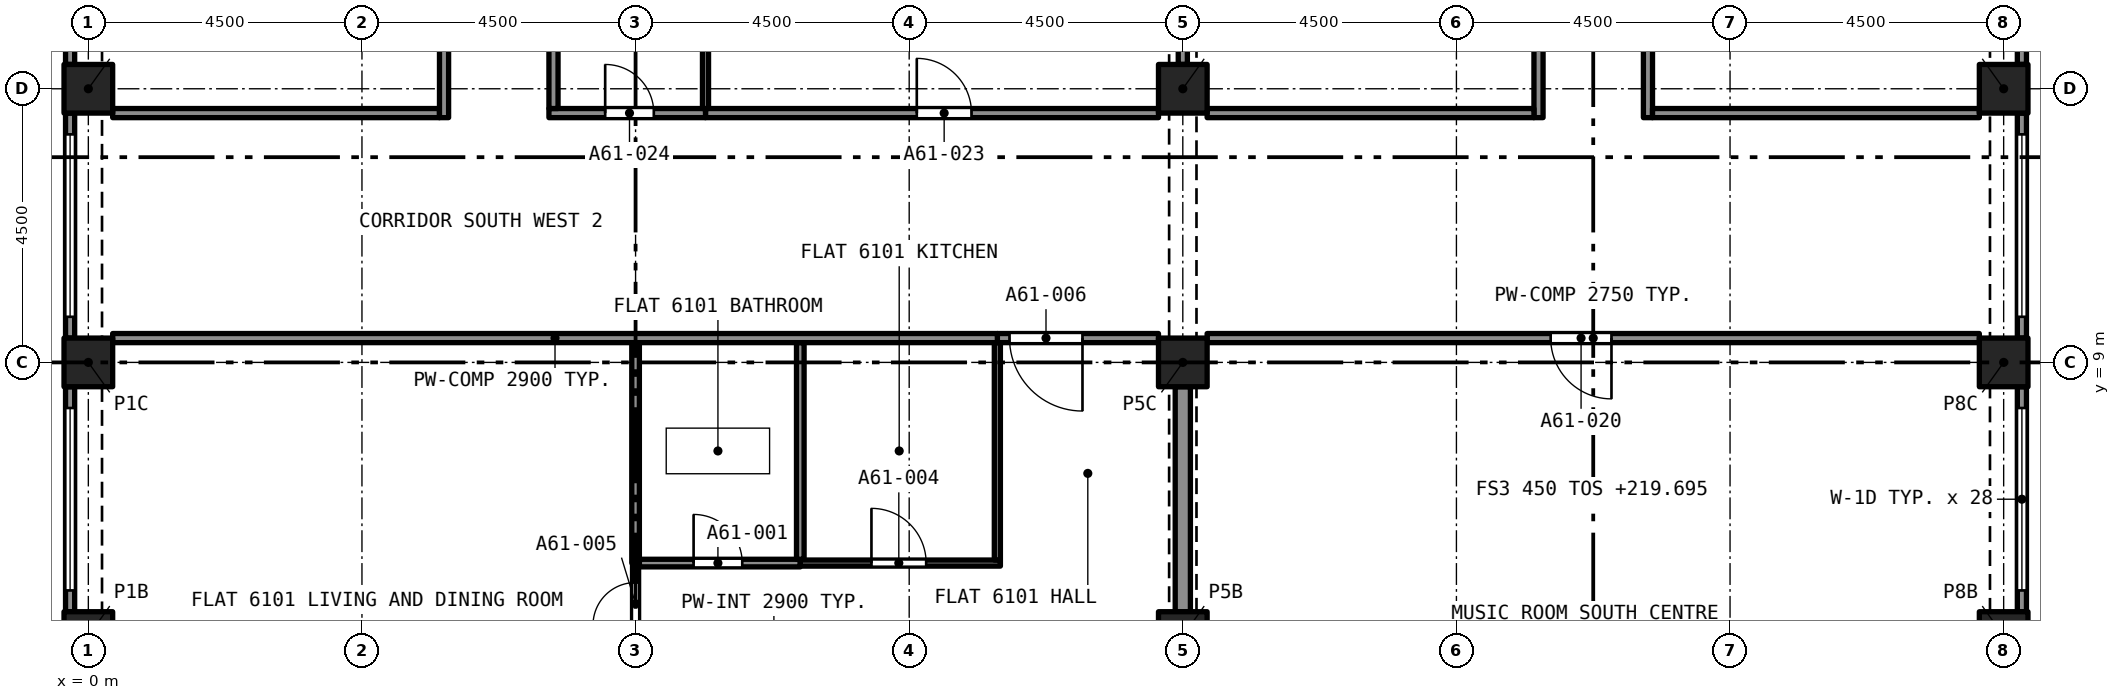
"""IFC4 building model, lengths in metres.
Left out: names, types, materials, properties, quantities, classifications, styles, units other than length and angle.
Written with IfcOpenShell. Run it as: python <this file> out.ifc"""

import sys

from ifc_helpers import new_model, si_unit, direction, frame, frame_2d, origin, origin_2d, place, context, subcontext, project, spatial, rectangle, extrude, element, fill, save


model = new_model("IFC4")
c1 = context("Model", 3, precision=1e-05, world=origin(), true_north=direction((0.0, 1.0)))
c2 = subcontext(c1, "Body", "Model", "MODEL_VIEW")
j1 = project(units=[si_unit("LENGTHUNIT", "METRE"), si_unit("PLANEANGLEUNIT", "RADIAN")], contexts=[c1])
p1 = place(None, origin())
s1 = spatial("IfcSite", under=j1, at=p1, CompositionType="ELEMENT")
p2 = place(p1, origin())
s2 = spatial("IfcBuilding", under=s1, at=p2, CompositionType="ELEMENT")
p3 = place(p2, frame((0.0, 0.0, 219.695)))
s3 = spatial("IfcBuildingStorey", under=s2, at=p3, CompositionType="ELEMENT", Elevation=219.695)
for number, where, z_axis, x_axis in (
    (1, (0.0, 4.5, 0.0), (0.0, 0.0, 1.0), (1.0, 0.0, 0.0)),
    (2, (18.0, 4.5, 0.0), (0.0, 0.0, 1.0), (1.0, 0.0, 0.0)),
    (3, (31.5, 4.5, 0.0), (0.0, 0.0, 1.0), (1.0, 0.0, 0.0)),
    (4, (0.0, 9.0, 0.0), (0.0, 0.0, 1.0), (1.0, 0.0, 0.0)),
    (5, (18.0, 9.0, 0.0), (0.0, 0.0, 1.0), (1.0, 0.0, 0.0)),
    (6, (31.5, 9.0, 0.0), (0.0, 0.0, 1.0), (1.0, 0.0, 0.0)),
    (7, (0.0, 13.5, 0.0), (0.0, 0.0, 1.0), (1.0, 0.0, 0.0)),
    (8, (18.0, 13.5, 0.0), (0.0, 0.0, 1.0), (1.0, 0.0, 0.0)),
    (9, (31.5, 13.5, 0.0), (0.0, 0.0, 1.0), (1.0, 0.0, 0.0)),
):
    element("IfcColumn", number, at=place(p3, frame(where, z_axis=z_axis, x_axis=x_axis)), inside=s3, PredefinedType="COLUMN", context=c2, shape_type="SweptSolid", body=[
        extrude(rectangle(XDim=0.8, YDim=0.8, at=origin_2d()), origin(), (0.0, 0.0, 1.0), 3.2),
    ])
p4 = place(p3, frame((31.8, 8.6, 0.0), z_axis=(0.0, 0.0, 1.0), x_axis=(0.0, -1.0, 0.0)))
e10 = element("IfcWall", 10, at=p4, inside=s3, PredefinedType="SOLIDWALL", context=c2, shape_type="SweptSolid", body=[
    extrude(rectangle(XDim=3.7, YDim=0.15, at=frame_2d((1.85, 0.0))), origin(), (0.0, 0.0, 1.0), 3.2),
])
p5 = place(p4, frame((0.35, 0.0, 0.45)))
e11 = element("IfcOpeningElement", 11, at=p5, cuts=e10, PredefinedType="OPENING", context=c2, shape_type="SweptSolid", body=[
    extrude(rectangle(XDim=3.0, YDim=1.95, at=frame_2d((1.5, 0.975))), frame((0.0, 0.085, 0.0), z_axis=(0.0, -1.0, 0.0), x_axis=(1.0, 0.0, 0.0)), (0.0, 0.0, 1.0), 0.17),
])
p6 = place(p3, frame((31.8, 13.1, 0.0), z_axis=(0.0, 0.0, 1.0), x_axis=(0.0, -1.0, 0.0)))
e12 = element("IfcWall", 12, at=p6, inside=s3, PredefinedType="SOLIDWALL", context=c2, shape_type="SweptSolid", body=[
    extrude(rectangle(XDim=3.7, YDim=0.15, at=frame_2d((1.85, 0.0))), origin(), (0.0, 0.0, 1.0), 3.2),
])
p7 = place(p6, frame((0.35, 0.0, 0.45)))
e13 = element("IfcOpeningElement", 13, at=p7, cuts=e12, PredefinedType="OPENING", context=c2, shape_type="SweptSolid", body=[
    extrude(rectangle(XDim=3.0, YDim=1.95, at=frame_2d((1.5, 0.975))), frame((0.0, 0.085, 0.0), z_axis=(0.0, -1.0, 0.0), x_axis=(1.0, 0.0, 0.0)), (0.0, 0.0, 1.0), 0.17),
])
p8 = place(p3, frame((31.8, 17.6, 0.0), z_axis=(0.0, 0.0, 1.0), x_axis=(0.0, -1.0, 0.0)))
e14 = element("IfcWall", 14, at=p8, inside=s3, PredefinedType="SOLIDWALL", context=c2, shape_type="SweptSolid", body=[
    extrude(rectangle(XDim=3.7, YDim=0.15, at=frame_2d((1.85, 0.0))), origin(), (0.0, 0.0, 1.0), 3.2),
])
p9 = place(p8, frame((0.35, 0.0, 0.45)))
e15 = element("IfcOpeningElement", 15, at=p9, cuts=e14, PredefinedType="OPENING", context=c2, shape_type="SweptSolid", body=[
    extrude(rectangle(XDim=3.0, YDim=1.95, at=frame_2d((1.5, 0.975))), frame((0.0, 0.085, 0.0), z_axis=(0.0, -1.0, 0.0), x_axis=(1.0, 0.0, 0.0)), (0.0, 0.0, 1.0), 0.17),
])
p10 = place(p3, frame((-0.3, 13.9, 0.0), z_axis=(0.0, 0.0, 1.0), x_axis=(0.0, 1.0, 0.0)))
e16 = element("IfcWall", 16, at=p10, inside=s3, PredefinedType="SOLIDWALL", context=c2, shape_type="SweptSolid", body=[
    extrude(rectangle(XDim=3.7, YDim=0.15, at=frame_2d((1.85, 0.0))), origin(), (0.0, 0.0, 1.0), 3.2),
])
p11 = place(p10, frame((0.35, 0.0, 0.45)))
e17 = element("IfcOpeningElement", 17, at=p11, cuts=e16, PredefinedType="OPENING", context=c2, shape_type="SweptSolid", body=[
    extrude(rectangle(XDim=3.0, YDim=1.95, at=frame_2d((1.5, 0.975))), frame((0.0, 0.085, 0.0), z_axis=(0.0, -1.0, 0.0), x_axis=(1.0, 0.0, 0.0)), (0.0, 0.0, 1.0), 0.17),
])
p12 = place(p3, frame((-0.3, 9.4, 0.0), z_axis=(0.0, 0.0, 1.0), x_axis=(0.0, 1.0, 0.0)))
e18 = element("IfcWall", 18, at=p12, inside=s3, PredefinedType="SOLIDWALL", context=c2, shape_type="SweptSolid", body=[
    extrude(rectangle(XDim=3.7, YDim=0.15, at=frame_2d((1.85, 0.0))), origin(), (0.0, 0.0, 1.0), 3.2),
])
p13 = place(p12, frame((0.35, 0.0, 0.45)))
e19 = element("IfcOpeningElement", 19, at=p13, cuts=e18, PredefinedType="OPENING", context=c2, shape_type="SweptSolid", body=[
    extrude(rectangle(XDim=3.0, YDim=1.95, at=frame_2d((1.5, 0.975))), frame((0.0, 0.085, 0.0), z_axis=(0.0, -1.0, 0.0), x_axis=(1.0, 0.0, 0.0)), (0.0, 0.0, 1.0), 0.17),
])
p14 = place(p3, frame((-0.3, 4.9, 0.0), z_axis=(0.0, 0.0, 1.0), x_axis=(0.0, 1.0, 0.0)))
e20 = element("IfcWall", 20, at=p14, inside=s3, PredefinedType="SOLIDWALL", context=c2, shape_type="SweptSolid", body=[
    extrude(rectangle(XDim=3.7, YDim=0.15, at=frame_2d((1.85, 0.0))), origin(), (0.0, 0.0, 1.0), 3.2),
])
p15 = place(p14, frame((0.35, 0.0, 0.45)))
e21 = element("IfcOpeningElement", 21, at=p15, cuts=e20, PredefinedType="OPENING", context=c2, shape_type="SweptSolid", body=[
    extrude(rectangle(XDim=3.0, YDim=1.95, at=frame_2d((1.5, 0.975))), frame((0.0, 0.085, 0.0), z_axis=(0.0, -1.0, 0.0), x_axis=(1.0, 0.0, 0.0)), (0.0, 0.0, 1.0), 0.17),
])
p16 = place(p3, frame((9.062, 5.7, 0.0), z_axis=(0.0, 0.0, 1.0), x_axis=(1.0, 0.0, 0.0)))
e22 = element("IfcWall", 22, at=p16, inside=s3, PredefinedType="PARTITIONING", context=c2, shape_type="SweptSolid", body=[
    extrude(rectangle(XDim=2.646, YDim=0.125, at=frame_2d((1.323, 0.0))), origin(), (0.0, 0.0, 1.0), 2.9),
])
p17 = place(p16, frame((0.892, 0.0, 0.0)))
e23 = element("IfcOpeningElement", 23, at=p17, cuts=e22, PredefinedType="OPENING", context=c2, shape_type="SweptSolid", body=[
    extrude(rectangle(XDim=0.8, YDim=2.1, at=frame_2d((0.4, 1.05))), frame((0.0, 0.073, 0.0), z_axis=(0.0, -1.0, 0.0), x_axis=(1.0, 0.0, 0.0)), (0.0, 0.0, 1.0), 0.145),
])
p18 = place(p3, frame((11.709, 5.762, 0.0), z_axis=(0.0, 0.0, 1.0), x_axis=(0.0, 1.0, 0.0)))
e24 = element("IfcWall", 24, at=p18, inside=s3, PredefinedType="PARTITIONING", context=c2, shape_type="SweptSolid", body=[
    extrude(rectangle(XDim=3.562, YDim=0.125, at=frame_2d((1.781, 0.0))), origin(), (0.0, 0.0, 1.0), 2.9),
])
p19 = place(p3, frame((9.0, 5.7, 0.0), z_axis=(0.0, 0.0, 1.0), x_axis=(0.0, 1.0, 0.0)))
e25 = element("IfcWall", 25, at=p19, inside=s3, PredefinedType="PARTITIONING", context=c2, shape_type="SweptSolid", body=[
    extrude(rectangle(XDim=3.625, YDim=0.125, at=frame_2d((1.812, 0.0))), origin(), (0.0, 0.0, 1.0), 2.9),
])
p20 = place(p3, frame((11.708, 5.7, 0.0), z_axis=(0.0, 0.0, 1.0), x_axis=(1.0, 0.0, 0.0)))
e26 = element("IfcWall", 26, at=p20, inside=s3, PredefinedType="PARTITIONING", context=c2, shape_type="SweptSolid", body=[
    extrude(rectangle(XDim=3.292, YDim=0.1, at=frame_2d((1.646, 0.0))), origin(), (0.0, 0.0, 1.0), 2.9),
])
p21 = place(p20, frame((1.171, 0.0, 0.0)))
e27 = element("IfcOpeningElement", 27, at=p21, cuts=e26, PredefinedType="OPENING", context=c2, shape_type="SweptSolid", body=[
    extrude(rectangle(XDim=0.9, YDim=2.1, at=frame_2d((0.45, 1.05))), frame((0.0, 0.06, 0.0), z_axis=(0.0, -1.0, 0.0), x_axis=(1.0, 0.0, 0.0)), (0.0, 0.0, 1.0), 0.12),
])
p22 = place(p3, frame((14.95, 5.75, 0.0), z_axis=(0.0, 0.0, 1.0), x_axis=(0.0, 1.0, 0.0)))
e28 = element("IfcWall", 28, at=p22, inside=s3, PredefinedType="PARTITIONING", context=c2, shape_type="SweptSolid", body=[
    extrude(rectangle(XDim=3.575, YDim=0.1, at=frame_2d((1.788, 0.0))), origin(), (0.0, 0.0, 1.0), 2.9),
])
p23 = place(p3, frame((9.0, 4.36, 0.0), z_axis=(0.0, 0.0, 1.0), x_axis=(0.0, 1.0, 0.0)))
e29 = element("IfcWall", 29, at=p23, inside=s3, PredefinedType="PARTITIONING", context=c2, shape_type="SweptSolid", body=[
    extrude(rectangle(XDim=1.34, YDim=0.1, at=frame_2d((0.67, 0.0))), origin(), (0.0, 0.0, 1.0), 2.9),
])
p24 = place(p23, frame((0.32, 0.0, 0.0)))
e30 = element("IfcOpeningElement", 30, at=p24, cuts=e29, PredefinedType="OPENING", context=c2, shape_type="SweptSolid", body=[
    extrude(rectangle(XDim=0.7, YDim=2.1, at=frame_2d((0.35, 1.05))), frame((0.0, 0.06, 0.0), z_axis=(0.0, -1.0, 0.0), x_axis=(1.0, 0.0, 0.0)), (0.0, 0.0, 1.0), 0.12),
])
p25 = place(p3, frame((18.0, 4.9, 0.0), z_axis=(0.0, 0.0, 1.0), x_axis=(0.0, 1.0, 0.0)))
e31 = element("IfcWall", 31, at=p25, inside=s3, PredefinedType="PARTITIONING", context=c2, shape_type="SweptSolid", body=[
    extrude(rectangle(XDim=3.7, YDim=0.25, at=frame_2d((1.85, 0.0))), origin(), (0.0, 0.0, 1.0), 2.38),
])
p26 = place(p3, frame((17.6, 9.4, 0.0), z_axis=(0.0, 0.0, 1.0), x_axis=(-1.0, 0.0, 0.0)))
e32 = element("IfcWall", 32, at=p26, inside=s3, PredefinedType="PARTITIONING", context=c2, shape_type="SweptSolid", body=[
    extrude(rectangle(XDim=2.65, YDim=0.15, at=frame_2d((1.325, 0.0))), origin(), (0.0, 0.0, 1.0), 2.9),
])
p27 = place(p26, frame((1.25, 0.0, 0.0)))
e33 = element("IfcOpeningElement", 33, at=p27, cuts=e32, PredefinedType="OPENING", context=c2, shape_type="SweptSolid", body=[
    extrude(rectangle(XDim=1.2, YDim=2.4, at=frame_2d((0.6, 1.2))), frame((0.0, 0.085, 0.0), z_axis=(0.0, -1.0, 0.0), x_axis=(1.0, 0.0, 0.0)), (0.0, 0.0, 1.0), 0.17),
])
p28 = place(p3, frame((0.4, 9.4, 0.0), z_axis=(0.0, 0.0, 1.0), x_axis=(1.0, 0.0, 0.0)))
e34 = element("IfcWall", 34, at=p28, inside=s3, PredefinedType="PARTITIONING", context=c2, shape_type="SweptSolid", body=[
    extrude(rectangle(XDim=14.55, YDim=0.15, at=frame_2d((7.275, 0.0))), origin(), (0.0, 0.0, 1.0), 2.9),
])
p29 = place(p3, frame((31.1, 9.4, 0.0), z_axis=(0.0, 0.0, 1.0), x_axis=(-1.0, 0.0, 0.0)))
e35 = element("IfcWall", 35, at=p29, inside=s3, PredefinedType="PARTITIONING", context=c2, shape_type="SweptSolid", body=[
    extrude(rectangle(XDim=12.7, YDim=0.15, at=frame_2d((6.35, 0.0))), origin(), (0.0, 0.0, 1.0), 2.75),
])
p30 = place(p29, frame((6.05, 0.0, 0.0)))
e36 = element("IfcOpeningElement", 36, at=p30, cuts=e35, PredefinedType="OPENING", context=c2, shape_type="SweptSolid", body=[
    extrude(rectangle(XDim=1.0, YDim=2.1, at=frame_2d((0.5, 1.05))), frame((0.0, 0.085, 0.0), z_axis=(0.0, -1.0, 0.0), x_axis=(1.0, 0.0, 0.0)), (0.0, 0.0, 1.0), 0.17),
])
p31 = place(p3, frame((23.85, 13.025, 0.0), z_axis=(0.0, 0.0, 1.0), x_axis=(0.0, 1.0, 0.0)))
e37 = element("IfcWall", 37, at=p31, inside=s3, PredefinedType="PARTITIONING", context=c2, shape_type="SweptSolid", body=[
    extrude(rectangle(XDim=9.55, YDim=0.15, at=frame_2d((4.775, 0.0))), origin(), (0.0, 0.0, 1.0), 2.75),
])
p32 = place(p31, frame((4.275, 0.0, 0.0)))
e38 = element("IfcOpeningElement", 38, at=p32, cuts=e37, PredefinedType="OPENING", context=c2, shape_type="SweptSolid", body=[
    extrude(rectangle(XDim=1.0, YDim=2.1, at=frame_2d((0.5, 1.05))), frame((0.0, 0.085, 0.0), z_axis=(0.0, -1.0, 0.0), x_axis=(1.0, 0.0, 0.0)), (0.0, 0.0, 1.0), 0.17),
])
p33 = place(p3, frame((25.65, 22.575, 0.0), z_axis=(0.0, 0.0, 1.0), x_axis=(0.0, -1.0, 0.0)))
e39 = element("IfcWall", 39, at=p33, inside=s3, PredefinedType="PARTITIONING", context=c2, shape_type="SweptSolid", body=[
    extrude(rectangle(XDim=9.55, YDim=0.15, at=frame_2d((4.775, 0.0))), origin(), (0.0, 0.0, 1.0), 2.75),
])
p34 = place(p33, frame((4.275, 0.0, 0.0)))
e40 = element("IfcOpeningElement", 40, at=p34, cuts=e39, PredefinedType="OPENING", context=c2, shape_type="SweptSolid", body=[
    extrude(rectangle(XDim=1.0, YDim=2.1, at=frame_2d((0.5, 1.05))), frame((0.0, 0.085, 0.0), z_axis=(0.0, -1.0, 0.0), x_axis=(1.0, 0.0, 0.0)), (0.0, 0.0, 1.0), 0.17),
])
for number, where, z_axis, x_axis in (
    (41, (18.4, 13.1, 0.0), (0.0, 0.0, 1.0), (1.0, 0.0, 0.0)),
    (42, (25.725, 13.1, 0.0), (0.0, 0.0, 1.0), (1.0, 0.0, 0.0)),
):
    element("IfcWall", number, at=place(p3, frame(where, z_axis=z_axis, x_axis=x_axis)), inside=s3, PredefinedType="PARTITIONING", context=c2, shape_type="SweptSolid", body=[
        extrude(rectangle(XDim=5.375, YDim=0.15, at=frame_2d((2.688, 0.0))), origin(), (0.0, 0.0, 1.0), 2.75),
    ])
p35 = place(p3, frame((10.15, 13.1, 0.0), z_axis=(0.0, 0.0, 1.0), x_axis=(1.0, 0.0, 0.0)))
e43 = element("IfcWall", 43, at=p35, inside=s3, PredefinedType="PARTITIONING", context=c2, shape_type="SweptSolid", body=[
    extrude(rectangle(XDim=7.45, YDim=0.15, at=frame_2d((3.725, 0.0))), origin(), (0.0, 0.0, 1.0), 2.9),
])
p36 = place(p35, frame((3.475, 0.0, 0.0)))
e44 = element("IfcOpeningElement", 44, at=p36, cuts=e43, PredefinedType="OPENING", context=c2, shape_type="SweptSolid", body=[
    extrude(rectangle(XDim=0.9, YDim=2.1, at=frame_2d((0.45, 1.05))), frame((0.0, 0.085, 0.0), z_axis=(0.0, -1.0, 0.0), x_axis=(1.0, 0.0, 0.0)), (0.0, 0.0, 1.0), 0.17),
])
p37 = place(p3, frame((7.575, 13.1, 0.0), z_axis=(0.0, 0.0, 1.0), x_axis=(1.0, 0.0, 0.0)))
e45 = element("IfcWall", 45, at=p37, inside=s3, PredefinedType="PARTITIONING", context=c2, shape_type="SweptSolid", body=[
    extrude(rectangle(XDim=2.575, YDim=0.15, at=frame_2d((1.288, 0.0))), origin(), (0.0, 0.0, 1.0), 2.9),
])
p38 = place(p37, frame((0.925, 0.0, 0.0)))
e46 = element("IfcOpeningElement", 46, at=p38, cuts=e45, PredefinedType="OPENING", context=c2, shape_type="SweptSolid", body=[
    extrude(rectangle(XDim=0.8, YDim=2.1, at=frame_2d((0.4, 1.05))), frame((0.0, 0.085, 0.0), z_axis=(0.0, -1.0, 0.0), x_axis=(1.0, 0.0, 0.0)), (0.0, 0.0, 1.0), 0.17),
])
p39 = place(p3, frame((0.4, 13.1, 0.0), z_axis=(0.0, 0.0, 1.0), x_axis=(1.0, 0.0, 0.0)))
e47 = element("IfcWall", 47, at=p39, inside=s3, PredefinedType="PARTITIONING", context=c2, shape_type="SweptSolid", body=[
    extrude(rectangle(XDim=5.375, YDim=0.15, at=frame_2d((2.688, 0.0))), origin(), (0.0, 0.0, 1.0), 2.9),
])
p40 = place(p3, frame((18.0, 13.9, 0.0), z_axis=(0.0, 0.0, 1.0), x_axis=(0.0, 1.0, 0.0)))
e48 = element("IfcWall", 48, at=p40, inside=s3, PredefinedType="PARTITIONING", context=c2, shape_type="SweptSolid", body=[
    extrude(rectangle(XDim=1.8, YDim=0.15, at=frame_2d((0.9, 0.0))), origin(), (0.0, 0.0, 1.0), 2.38),
])
p41 = place(p3, frame((7.65, 13.175, 0.0), z_axis=(0.0, 0.0, 1.0), x_axis=(0.0, 1.0, 0.0)))
e49 = element("IfcWall", 49, at=p41, inside=s3, PredefinedType="PARTITIONING", context=c2, shape_type="SweptSolid", body=[
    extrude(rectangle(XDim=2.525, YDim=0.15, at=frame_2d((1.262, 0.0))), origin(), (0.0, 0.0, 1.0), 2.9),
])
p42 = place(p3, frame((5.85, 13.025, 0.0), z_axis=(0.0, 0.0, 1.0), x_axis=(0.0, 1.0, 0.0)))
e50 = element("IfcWall", 50, at=p42, inside=s3, PredefinedType="PARTITIONING", context=c2, shape_type="SweptSolid", body=[
    extrude(rectangle(XDim=9.475, YDim=0.15, at=frame_2d((4.738, 0.0))), origin(), (0.0, 0.0, 1.0), 2.9),
])
p43 = place(p42, frame((4.275, 0.0, 0.0)))
e51 = element("IfcOpeningElement", 51, at=p43, cuts=e50, PredefinedType="OPENING", context=c2, shape_type="SweptSolid", body=[
    extrude(rectangle(XDim=1.0, YDim=2.1, at=frame_2d((0.5, 1.05))), frame((0.0, 0.085, 0.0), z_axis=(0.0, -1.0, 0.0), x_axis=(1.0, 0.0, 0.0)), (0.0, 0.0, 1.0), 0.17),
])
p44 = place(p3, frame((10.15, 13.175, 0.0), z_axis=(0.0, 0.0, 1.0), x_axis=(0.0, 1.0, 0.0)))
e52 = element("IfcWall", 52, at=p44, inside=s3, PredefinedType="PARTITIONING", context=c2, shape_type="SweptSolid", body=[
    extrude(rectangle(XDim=2.45, YDim=0.1, at=frame_2d((1.225, 0.0))), origin(), (0.0, 0.0, 1.0), 2.9),
])
p45 = place(p5, origin())
e53 = element("IfcWindow", 53, at=p45, inside=s3, PartitioningType="SINGLE_PANEL", PredefinedType="WINDOW", context=c2, shape_type="SweptSolid", body=[
    extrude(rectangle(XDim=3.0, YDim=1.95, at=frame_2d((1.5, 0.975))), frame((0.0, 0.03, 0.0), z_axis=(0.0, -1.0, 0.0), x_axis=(1.0, 0.0, 0.0)), (0.0, 0.0, 1.0), 0.06),
])
fill(e11, e53)
p46 = place(p7, origin())
e54 = element("IfcWindow", 54, at=p46, inside=s3, PartitioningType="SINGLE_PANEL", PredefinedType="WINDOW", context=c2, shape_type="SweptSolid", body=[
    extrude(rectangle(XDim=3.0, YDim=1.95, at=frame_2d((1.5, 0.975))), frame((0.0, 0.03, 0.0), z_axis=(0.0, -1.0, 0.0), x_axis=(1.0, 0.0, 0.0)), (0.0, 0.0, 1.0), 0.06),
])
fill(e13, e54)
p47 = place(p13, origin())
e55 = element("IfcWindow", 55, at=p47, inside=s3, PartitioningType="SINGLE_PANEL", PredefinedType="WINDOW", context=c2, shape_type="SweptSolid", body=[
    extrude(rectangle(XDim=3.0, YDim=1.95, at=frame_2d((1.5, 0.975))), frame((0.0, 0.03, 0.0), z_axis=(0.0, -1.0, 0.0), x_axis=(1.0, 0.0, 0.0)), (0.0, 0.0, 1.0), 0.06),
])
fill(e19, e55)
p48 = place(p15, origin())
e56 = element("IfcWindow", 56, at=p48, inside=s3, PartitioningType="SINGLE_PANEL", PredefinedType="WINDOW", context=c2, shape_type="SweptSolid", body=[
    extrude(rectangle(XDim=3.0, YDim=1.95, at=frame_2d((1.5, 0.975))), frame((0.0, 0.03, 0.0), z_axis=(0.0, -1.0, 0.0), x_axis=(1.0, 0.0, 0.0)), (0.0, 0.0, 1.0), 0.06),
])
fill(e21, e56)
p49 = place(p17, origin())
e57 = element("IfcDoor", 57, at=p49, inside=s3, OperationType="SINGLE_SWING_LEFT", PredefinedType="DOOR", context=c2, shape_type="SweptSolid", body=[
    extrude(rectangle(XDim=0.8, YDim=2.1, at=frame_2d((0.4, 1.05))), frame((0.0, 0.025, 0.0), z_axis=(0.0, -1.0, 0.0), x_axis=(1.0, 0.0, 0.0)), (0.0, 0.0, 1.0), 0.05),
])
fill(e23, e57)
p50 = place(p21, origin())
e58 = element("IfcDoor", 58, at=p50, inside=s3, OperationType="SINGLE_SWING_LEFT", PredefinedType="DOOR", context=c2, shape_type="SweptSolid", body=[
    extrude(rectangle(XDim=0.9, YDim=2.1, at=frame_2d((0.45, 1.05))), frame((0.0, 0.025, 0.0), z_axis=(0.0, -1.0, 0.0), x_axis=(1.0, 0.0, 0.0)), (0.0, 0.0, 1.0), 0.05),
])
fill(e27, e58)
p51 = place(p24, origin())
e59 = element("IfcDoor", 59, at=p51, inside=s3, OperationType="SINGLE_SWING_LEFT", PredefinedType="DOOR", context=c2, shape_type="SweptSolid", body=[
    extrude(rectangle(XDim=0.7, YDim=2.1, at=frame_2d((0.35, 1.05))), frame((0.0, 0.025, 0.0), z_axis=(0.0, -1.0, 0.0), x_axis=(1.0, 0.0, 0.0)), (0.0, 0.0, 1.0), 0.05),
])
fill(e30, e59)
p52 = place(p27, origin())
e60 = element("IfcDoor", 60, at=p52, inside=s3, OperationType="SINGLE_SWING_RIGHT", PredefinedType="DOOR", context=c2, shape_type="SweptSolid", body=[
    extrude(rectangle(XDim=1.2, YDim=2.4, at=frame_2d((0.6, 1.2))), frame((0.0, 0.025, 0.0), z_axis=(0.0, -1.0, 0.0), x_axis=(1.0, 0.0, 0.0)), (0.0, 0.0, 1.0), 0.05),
])
fill(e33, e60)
p53 = place(p30, origin())
e61 = element("IfcDoor", 61, at=p53, inside=s3, OperationType="SINGLE_SWING_RIGHT", PredefinedType="DOOR", context=c2, shape_type="SweptSolid", body=[
    extrude(rectangle(XDim=1.0, YDim=2.1, at=frame_2d((0.5, 1.05))), frame((0.0, 0.025, 0.0), z_axis=(0.0, -1.0, 0.0), x_axis=(1.0, 0.0, 0.0)), (0.0, 0.0, 1.0), 0.05),
])
fill(e36, e61)
p54 = place(p36, origin())
e62 = element("IfcDoor", 62, at=p54, inside=s3, OperationType="SINGLE_SWING_RIGHT", PredefinedType="DOOR", context=c2, shape_type="SweptSolid", body=[
    extrude(rectangle(XDim=0.9, YDim=2.1, at=frame_2d((0.45, 1.05))), frame((0.0, 0.025, 0.0), z_axis=(0.0, -1.0, 0.0), x_axis=(1.0, 0.0, 0.0)), (0.0, 0.0, 1.0), 0.05),
])
fill(e44, e62)
p55 = place(p38, origin())
e63 = element("IfcDoor", 63, at=p55, inside=s3, OperationType="SINGLE_SWING_RIGHT", PredefinedType="DOOR", context=c2, shape_type="SweptSolid", body=[
    extrude(rectangle(XDim=0.8, YDim=2.1, at=frame_2d((0.4, 1.05))), frame((0.0, 0.025, 0.0), z_axis=(0.0, -1.0, 0.0), x_axis=(1.0, 0.0, 0.0)), (0.0, 0.0, 1.0), 0.05),
])
fill(e46, e63)
save(model, sys.argv[1])
